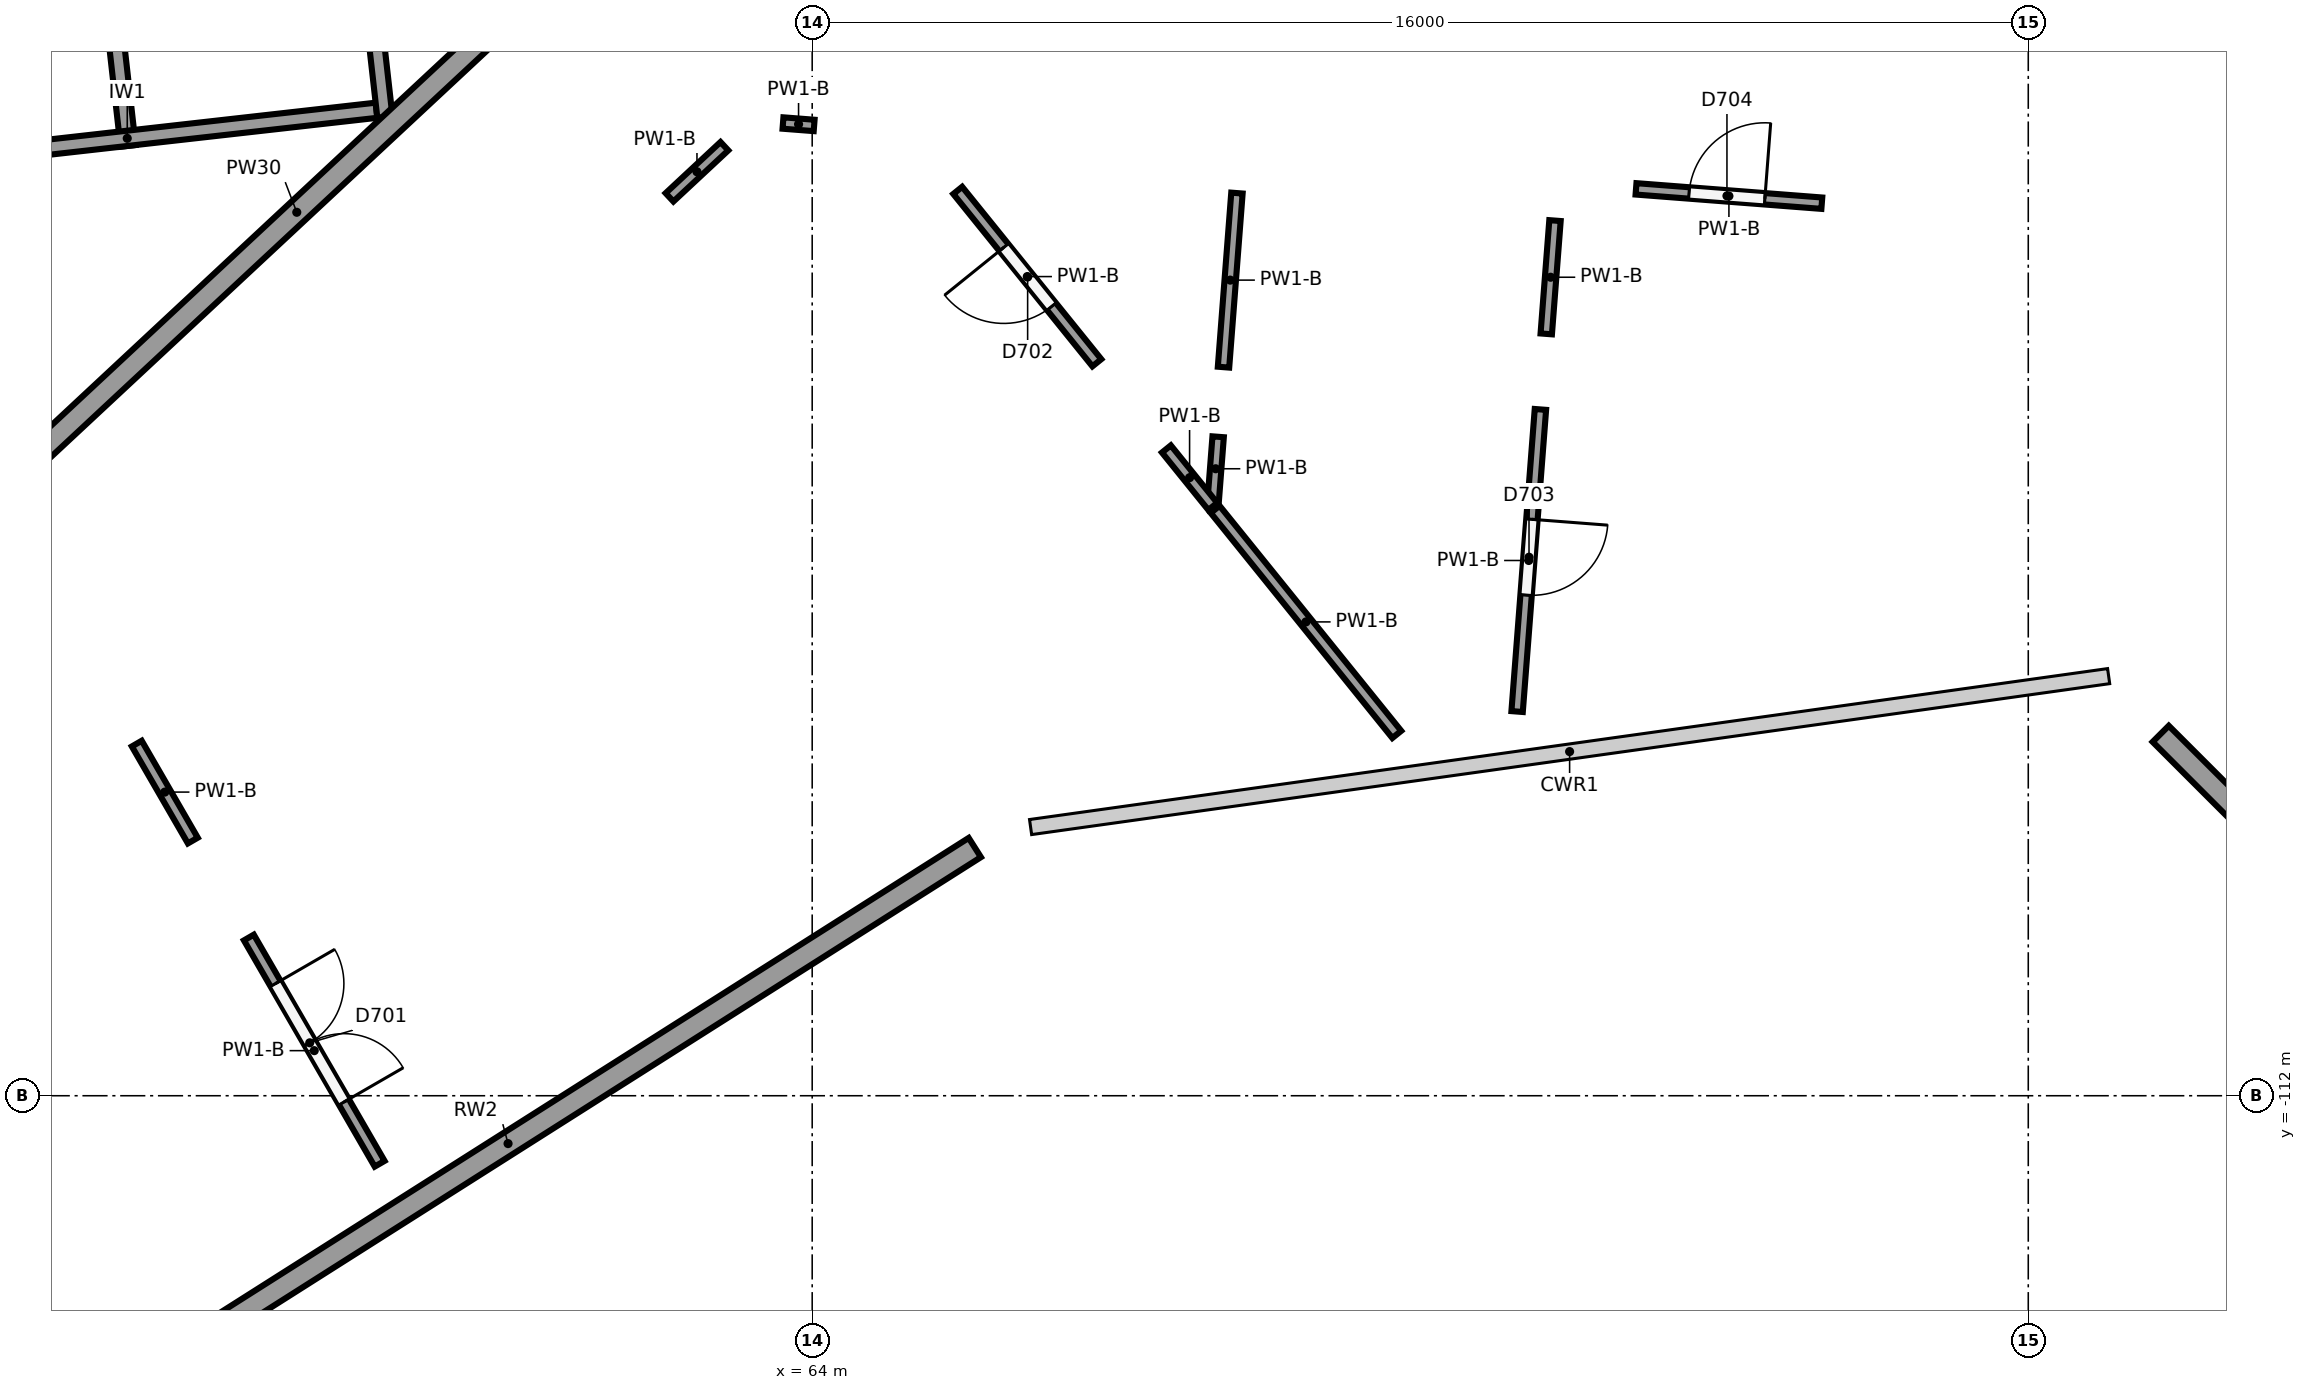
"""IFC4 building model, lengths in metres.
Left out: names, types, materials, properties, quantities, classifications, styles, units other than length and angle.
Written with IfcOpenShell. Run it as: python <this file> out.ifc"""

import sys

from ifc_helpers import new_model, si_unit, direction, frame, frame_2d, origin, origin_2d, place, context, subcontext, project, spatial, polyline, rectangle, circle, outline, extrude, element, fill, save


model = new_model("IFC4")
c1 = context("Model", 3, precision=1e-05, world=origin(), true_north=direction((0.0, 1.0)))
c2 = subcontext(c1, "Body", "Model", "MODEL_VIEW")
j1 = project(units=[si_unit("LENGTHUNIT", "METRE"), si_unit("PLANEANGLEUNIT", "RADIAN")], contexts=[c1])
p1 = place(None, origin())
s1 = spatial("IfcSite", under=j1, at=p1, CompositionType="ELEMENT")
p2 = place(p1, origin())
s2 = spatial("IfcBuilding", under=s1, at=p2, CompositionType="ELEMENT")
p3 = place(p2, frame((0.0, 0.0, 6.5)))
s3 = spatial("IfcBuildingStorey", under=s2, at=p3, CompositionType="ELEMENT", Elevation=6.5)
for number, where, z_axis, x_axis in (
    (1, (63.373, -99.648, 0.0), (0.0, 0.0, 1.0), (1.0, 0.0, 0.0)),
    (2, (64.694, -103.424, 0.0), (0.0, 0.0, 1.0), (1.0, 0.0, 0.0)),
    (3, (66.477, -108.521, 0.0), (0.0, 0.0, 1.0), (1.0, 0.0, 0.0)),
    (4, (77.187, -99.634, 0.0), (0.0, 0.0, 1.0), (1.0, 0.0, 0.0)),
    (5, (78.581, -101.852, 0.0), (0.0, 0.0, 1.0), (1.0, 0.0, 0.0)),
    (6, (81.454, -106.424, 0.0), (0.0, 0.0, 1.0), (1.0, 0.0, 0.0)),
):
    element("IfcColumn", number, at=place(p3, frame(where, z_axis=z_axis, x_axis=x_axis)), inside=s3, PredefinedType="COLUMN", context=c2, shape_type="SweptSolid", body=[
        extrude(circle(Radius=0.4, at=origin_2d()), origin(), (0.0, 0.0, 1.0), 5.5),
    ])
p4 = place(p3, frame((66.139, -108.735, 0.0), z_axis=(0.0, 0.0, 1.0), x_axis=(-0.844493393786, -0.535565969654, 0.0)))
e7 = element("IfcWall", 7, at=p4, inside=s3, PredefinedType="SOLIDWALL", context=c2, shape_type="SweptSolid", body=[
    extrude(rectangle(XDim=14.544, YDim=0.3, at=frame_2d((7.272, 0.0))), origin(), (0.0, 0.0, 1.0), 3.85),
])
p5 = place(p3, frame((81.201, -99.793, 0.0), z_axis=(0.0, 0.0, 1.0), x_axis=(1.0, 0.0, 0.0)))
e8 = element("IfcColumn", 8, at=p5, inside=s3, PredefinedType="COLUMN", context=c2, shape_type="SweptSolid", body=[
    extrude(circle(Radius=0.3, at=origin_2d()), origin(), (0.0, 0.0, 1.0), 4.433),
])
p6 = place(p3, frame((86.376, -111.872, 0.0), z_axis=(0.0, 0.0, 1.0), x_axis=(-0.707106781187, 0.707106781187, 0.0)))
e9 = element("IfcWall", 9, at=p6, inside=s3, PredefinedType="SOLIDWALL", context=c2, shape_type="SweptSolid", body=[
    extrude(outline(polyline([(0.0, 0.0), (6.552, 0.0), (6.552, 5.128), (0.0, 4.998), (0.0, 0.0)])), frame((0.0, 0.15, 0.0), z_axis=(0.0, -1.0, 0.0), x_axis=(1.0, 0.0, 0.0)), (0.0, 0.0, 1.0), 0.3),
])
p7 = place(p3, frame((61.723, -96.179, 0.0), z_axis=(0.0, 0.0, 1.0), x_axis=(-0.731540985517, -0.681797467368, 0.0)))
e10 = element("IfcWall", 10, at=p7, inside=s3, PredefinedType="SOLIDWALL", context=c2, shape_type="SweptSolid", body=[
    extrude(rectangle(XDim=12.314, YDim=0.3, at=frame_2d((6.157, 0.0))), origin(), (0.0, 0.0, 1.0), 3.85),
])
p8 = place(p3, frame((58.378, -99.123, 0.0), z_axis=(0.0, 0.0, 1.0), x_axis=(-0.111982724367, 0.993710153638, 0.0)))
e11 = element("IfcWall", 11, at=p8, inside=s3, PredefinedType="SHEAR", context=c2, shape_type="SweptSolid", body=[
    extrude(rectangle(XDim=7.6, YDim=0.2, at=frame_2d((3.8, 0.0))), origin(), (0.0, 0.0, 1.0), 5.15),
])
p9 = place(p3, frame((51.709, -99.774, 0.0), z_axis=(0.0, 0.0, 1.0), x_axis=(0.993715690617, 0.111933579504, 0.0)))
e12 = element("IfcWall", 12, at=p9, inside=s3, PredefinedType="SHEAR", context=c2, shape_type="SweptSolid", body=[
    extrude(rectangle(XDim=6.6, YDim=0.2, at=frame_2d((3.3, 0.0))), origin(), (0.0, 0.0, 1.0), 5.15),
])
p10 = place(p3, frame((54.999, -99.504, 0.0), z_axis=(0.0, 0.0, 1.0), x_axis=(-0.111982724367, 0.993710153638, 0.0)))
e13 = element("IfcWall", 13, at=p10, inside=s3, PredefinedType="SHEAR", context=c2, shape_type="SweptSolid", body=[
    extrude(rectangle(XDim=7.6, YDim=0.2, at=frame_2d((3.8, 0.0))), origin(), (0.0, 0.0, 1.0), 5.15),
])
p11 = place(p3, frame((55.114, -107.367, 0.0), z_axis=(0.0, 0.0, 1.0), x_axis=(0.500539815233, -0.865713516913, 0.0)))
e14 = element("IfcWall", 14, at=p11, inside=s3, PredefinedType="PARTITIONING", context=c2, shape_type="SweptSolid", body=[
    extrude(rectangle(XDim=1.473, YDim=0.15, at=frame_2d((0.737, 0.0))), origin(), (0.0, 0.0, 1.0), 5.05),
])
p12 = place(p3, frame((56.588, -109.919, 0.0), z_axis=(0.0, 0.0, 1.0), x_axis=(0.500453880067, -0.865763197373, 0.0)))
e15 = element("IfcWall", 15, at=p12, inside=s3, PredefinedType="PARTITIONING", context=c2, shape_type="SweptSolid", body=[
    extrude(rectangle(XDim=3.438, YDim=0.15, at=frame_2d((1.719, 0.0))), origin(), (0.0, 0.0, 1.0), 5.05),
])
p13 = place(p12, frame((0.7, 0.0, 0.0)))
e16 = element("IfcOpeningElement", 16, at=p13, cuts=e15, PredefinedType="OPENING", context=c2, shape_type="SweptSolid", body=[
    extrude(rectangle(XDim=1.8, YDim=2.1, at=frame_2d((0.9, 1.05))), frame((0.0, 0.085, 0.0), z_axis=(0.0, -1.0, 0.0), x_axis=(1.0, 0.0, 0.0)), (0.0, 0.0, 1.0), 0.17),
])
p14 = place(p3, frame((69.588, -100.125, 0.0), z_axis=(0.0, 0.0, 1.0), x_axis=(-0.076842793835, -0.997043221248, 0.0)))
e17 = element("IfcWall", 17, at=p14, inside=s3, PredefinedType="PARTITIONING", context=c2, shape_type="SweptSolid", body=[
    extrude(rectangle(XDim=2.297, YDim=0.15, at=frame_2d((1.148, 0.0))), origin(), (0.0, 0.0, 1.0), 5.05),
])
p15 = place(p3, frame((69.341, -103.331, 0.0), z_axis=(0.0, 0.0, 1.0), x_axis=(-0.076961999747, -0.997034026799, 0.0)))
e18 = element("IfcWall", 18, at=p15, inside=s3, PredefinedType="PARTITIONING", context=c2, shape_type="SweptSolid", body=[
    extrude(rectangle(XDim=0.844, YDim=0.15, at=frame_2d((0.422, 0.0))), origin(), (0.0, 0.0, 1.0), 5.05),
])
p16 = place(p3, frame((69.271, -104.247, 0.0), z_axis=(0.0, 0.0, 1.0), x_axis=(-0.628091363936, 0.778139600939, 0.0)))
e19 = element("IfcWall", 19, at=p16, inside=s3, PredefinedType="PARTITIONING", context=c2, shape_type="SweptSolid", body=[
    extrude(rectangle(XDim=0.971, YDim=0.15, at=frame_2d((0.486, 0.0))), origin(), (0.0, 0.0, 1.0), 5.05),
])
p17 = place(p3, frame((67.745, -102.357, 0.0), z_axis=(0.0, 0.0, 1.0), x_axis=(-0.627999686033, 0.778213591723, 0.0)))
e20 = element("IfcWall", 20, at=p17, inside=s3, PredefinedType="PARTITIONING", context=c2, shape_type="SweptSolid", body=[
    extrude(rectangle(XDim=2.914, YDim=0.15, at=frame_2d((1.457, 0.0))), origin(), (0.0, 0.0, 1.0), 5.05),
])
p18 = place(p17, frame((0.95, 0.0, 0.0)))
e21 = element("IfcOpeningElement", 21, at=p18, cuts=e20, PredefinedType="OPENING", context=c2, shape_type="SweptSolid", body=[
    extrude(rectangle(XDim=1.0, YDim=2.1, at=frame_2d((0.5, 1.05))), frame((0.0, 0.085, 0.0), z_axis=(0.0, -1.0, 0.0), x_axis=(1.0, 0.0, 0.0)), (0.0, 0.0, 1.0), 0.17),
])
p19 = place(p3, frame((71.691, -107.247, 0.0), z_axis=(0.0, 0.0, 1.0), x_axis=(-0.62800699808, 0.77820769102, 0.0)))
e22 = element("IfcWall", 22, at=p19, inside=s3, PredefinedType="PARTITIONING", context=c2, shape_type="SweptSolid", body=[
    extrude(rectangle(XDim=3.805, YDim=0.15, at=frame_2d((1.903, 0.0))), origin(), (0.0, 0.0, 1.0), 5.05),
])
p20 = place(p3, frame((73.773, -100.487, 0.0), z_axis=(0.0, 0.0, 1.0), x_axis=(-0.076921295025, -0.997037167999, 0.0)))
e23 = element("IfcWall", 23, at=p20, inside=s3, PredefinedType="PARTITIONING", context=c2, shape_type="SweptSolid", body=[
    extrude(rectangle(XDim=1.495, YDim=0.15, at=frame_2d((0.748, 0.0))), origin(), (0.0, 0.0, 1.0), 5.05),
])
p21 = place(p3, frame((73.581, -102.971, 0.0), z_axis=(0.0, 0.0, 1.0), x_axis=(-0.076916598372, -0.997037530334, 0.0)))
e24 = element("IfcWall", 24, at=p21, inside=s3, PredefinedType="PARTITIONING", context=c2, shape_type="SweptSolid", body=[
    extrude(rectangle(XDim=3.987, YDim=0.15, at=frame_2d((1.993, 0.0))), origin(), (0.0, 0.0, 1.0), 5.05),
])
p22 = place(p21, frame((1.45, 0.0, 0.0)))
e25 = element("IfcOpeningElement", 25, at=p22, cuts=e24, PredefinedType="OPENING", context=c2, shape_type="SweptSolid", body=[
    extrude(rectangle(XDim=1.0, YDim=2.1, at=frame_2d((0.5, 1.05))), frame((0.0, 0.085, 0.0), z_axis=(0.0, -1.0, 0.0), x_axis=(1.0, 0.0, 0.0)), (0.0, 0.0, 1.0), 0.17),
])
p23 = place(p3, frame((74.839, -100.069, 0.0), z_axis=(0.0, 0.0, 1.0), x_axis=(0.997040998255, -0.076871631944, 0.0)))
e26 = element("IfcWall", 26, at=p23, inside=s3, PredefinedType="PARTITIONING", context=c2, shape_type="SweptSolid", body=[
    extrude(rectangle(XDim=2.452, YDim=0.15, at=frame_2d((1.226, 0.0))), origin(), (0.0, 0.0, 1.0), 5.05),
])
p24 = place(p23, frame((0.7, 0.0, 0.0)))
e27 = element("IfcOpeningElement", 27, at=p24, cuts=e26, PredefinedType="OPENING", context=c2, shape_type="SweptSolid", body=[
    extrude(rectangle(XDim=1.0, YDim=2.1, at=frame_2d((0.5, 1.05))), frame((0.0, 0.085, 0.0), z_axis=(0.0, -1.0, 0.0), x_axis=(1.0, 0.0, 0.0)), (0.0, 0.0, 1.0), 0.17),
])
p25 = place(p3, frame((62.123, -100.18, 0.0), z_axis=(0.0, 0.0, 1.0), x_axis=(0.731655638736, 0.681674428379, 0.0)))
e28 = element("IfcWall", 28, at=p25, inside=s3, PredefinedType="PARTITIONING", context=c2, shape_type="SweptSolid", body=[
    extrude(rectangle(XDim=0.987, YDim=0.15, at=frame_2d((0.493, 0.0))), origin(), (0.0, 0.0, 1.0), 5.05),
])
p26 = place(p3, frame((63.616, -99.203, 0.0), z_axis=(0.0, 0.0, 1.0), x_axis=(0.997012395214, -0.07724172311, 0.0)))
e29 = element("IfcWall", 29, at=p26, inside=s3, PredefinedType="PARTITIONING", context=c2, shape_type="SweptSolid", body=[
    extrude(rectangle(XDim=0.411, YDim=0.15, at=frame_2d((0.206, 0.0))), origin(), (0.0, 0.0, 1.0), 5.05),
])
p27 = place(p13, origin())
e30 = element("IfcDoor", 30, at=p27, inside=s3, OperationType="DOUBLE_DOOR_SINGLE_SWING", PredefinedType="DOOR", context=c2, shape_type="SweptSolid", body=[
    extrude(rectangle(XDim=1.8, YDim=2.1, at=frame_2d((0.9, 1.05))), frame((0.0, 0.025, 0.0), z_axis=(0.0, -1.0, 0.0), x_axis=(1.0, 0.0, 0.0)), (0.0, 0.0, 1.0), 0.05),
])
fill(e16, e30)
p28 = place(p18, origin())
e31 = element("IfcDoor", 31, at=p28, inside=s3, OperationType="SINGLE_SWING_RIGHT", PredefinedType="DOOR", context=c2, shape_type="SweptSolid", body=[
    extrude(rectangle(XDim=1.0, YDim=2.1, at=frame_2d((0.5, 1.05))), frame((0.0, 0.025, 0.0), z_axis=(0.0, -1.0, 0.0), x_axis=(1.0, 0.0, 0.0)), (0.0, 0.0, 1.0), 0.05),
])
fill(e21, e31)
p29 = place(p22, origin())
e32 = element("IfcDoor", 32, at=p29, inside=s3, OperationType="SINGLE_SWING_LEFT", PredefinedType="DOOR", context=c2, shape_type="SweptSolid", body=[
    extrude(rectangle(XDim=1.0, YDim=2.1, at=frame_2d((0.5, 1.05))), frame((0.0, 0.025, 0.0), z_axis=(0.0, -1.0, 0.0), x_axis=(1.0, 0.0, 0.0)), (0.0, 0.0, 1.0), 0.05),
])
fill(e25, e32)
p30 = place(p24, origin())
e33 = element("IfcDoor", 33, at=p30, inside=s3, OperationType="SINGLE_SWING_RIGHT", PredefinedType="DOOR", context=c2, shape_type="SweptSolid", body=[
    extrude(rectangle(XDim=1.0, YDim=2.1, at=frame_2d((0.5, 1.05))), frame((0.0, 0.025, 0.0), z_axis=(0.0, -1.0, 0.0), x_axis=(1.0, 0.0, 0.0)), (0.0, 0.0, 1.0), 0.05),
])
fill(e27, e33)
save(model, sys.argv[1])
